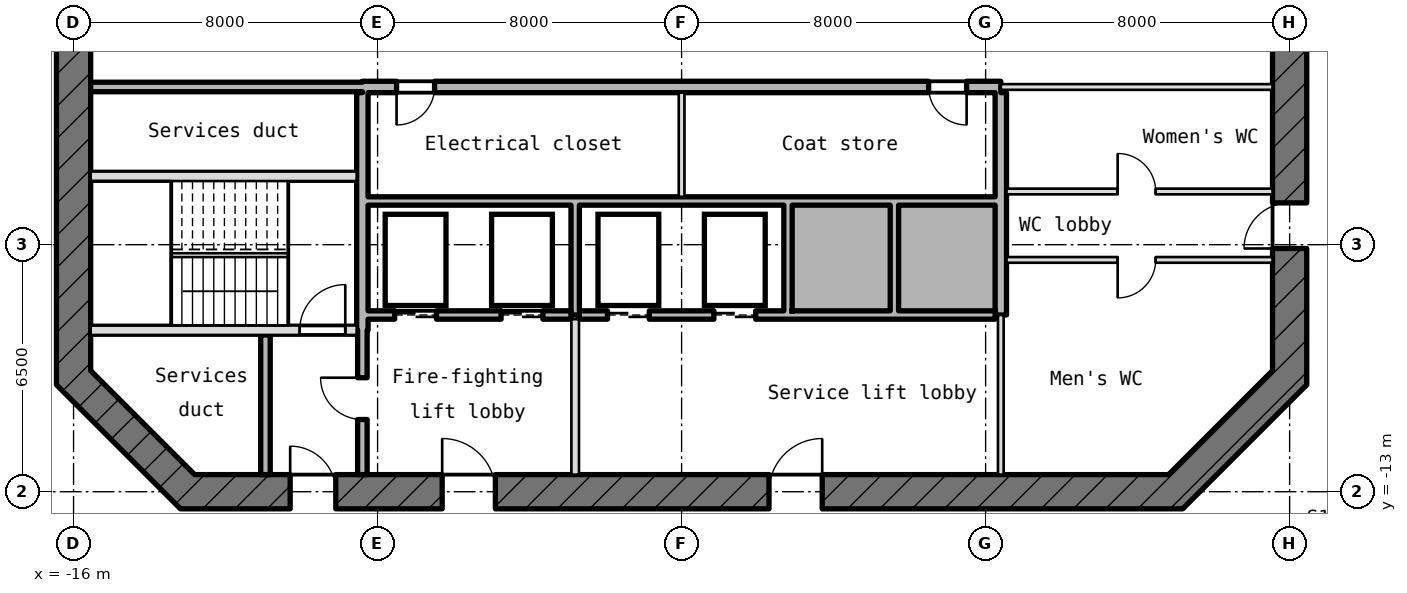
"""IFC4 building model, lengths in metres.
Left out: names, types, materials, properties, quantities, classifications, styles, units other than length and angle.
Written with IfcOpenShell. Run it as: python <this file> out.ifc"""

import sys

from ifc_helpers import new_model, si_unit, direction, frame, frame_2d, origin, place, context, subcontext, project, spatial, rectangle, extrude, element, fill, save


model = new_model("IFC4")
c1 = context("Model", 3, precision=1e-05, world=origin(), true_north=direction((0.0, 1.0)))
c2 = subcontext(c1, "Body", "Model", "MODEL_VIEW")
j1 = project(units=[si_unit("LENGTHUNIT", "METRE"), si_unit("PLANEANGLEUNIT", "RADIAN")], contexts=[c1])
p1 = place(None, origin())
s1 = spatial("IfcSite", under=j1, at=p1, CompositionType="ELEMENT")
p2 = place(p1, origin())
s2 = spatial("IfcBuilding", under=s1, at=p2, CompositionType="ELEMENT")
p3 = place(p2, frame((0.0, 0.0, 198.4)))
s3 = spatial("IfcBuildingStorey", under=s2, at=p3, CompositionType="ELEMENT", Elevation=198.4)
p4 = place(p3, frame((12.868, -13.132, -0.18), z_axis=(0.0, 0.0, 1.0), x_axis=(0.707106781187, 0.707106781187, 0.0)))
e1 = element("IfcWall", 1, at=p4, inside=s3, PredefinedType="SHEAR", context=c2, shape_type="SweptSolid", body=[
    extrude(rectangle(XDim=4.615, YDim=0.9, at=frame_2d((2.308, 0.0))), origin(), (0.0, 0.0, 1.0), 4.15),
])
p5 = place(p3, frame((16.0, -10.186, -0.18), z_axis=(0.0, 0.0, 1.0), x_axis=(0.0, 1.0, 0.0)))
e2 = element("IfcWall", 2, at=p5, inside=s3, PredefinedType="SHEAR", context=c2, shape_type="SweptSolid", body=[
    extrude(rectangle(XDim=20.373, YDim=0.9, at=frame_2d((10.186, 0.0))), origin(), (0.0, 0.0, 1.0), 4.15),
])
p6 = place(p5, frame((8.986, 0.0, 0.18)))
e3 = element("IfcOpeningElement", 3, at=p6, cuts=e2, PredefinedType="OPENING", context=c2, shape_type="SweptSolid", body=[
    extrude(rectangle(XDim=2.4, YDim=2.1, at=frame_2d((1.2, 1.05))), frame((0.0, 0.46, 0.0), z_axis=(0.0, -1.0, 0.0), x_axis=(1.0, 0.0, 0.0)), (0.0, 0.0, 1.0), 0.92),
])
p7 = place(p5, frame((13.586, 0.0, 0.18)))
e4 = element("IfcOpeningElement", 4, at=p7, cuts=e2, PredefinedType="OPENING", context=c2, shape_type="SweptSolid", body=[
    extrude(rectangle(XDim=1.2, YDim=2.1, at=frame_2d((0.6, 1.05))), frame((0.0, 0.46, 0.0), z_axis=(0.0, -1.0, 0.0), x_axis=(1.0, 0.0, 0.0)), (0.0, 0.0, 1.0), 0.92),
])
p8 = place(p5, frame((3.586, 0.0, 0.18)))
e5 = element("IfcOpeningElement", 5, at=p8, cuts=e2, PredefinedType="OPENING", context=c2, shape_type="SweptSolid", body=[
    extrude(rectangle(XDim=1.2, YDim=2.1, at=frame_2d((0.6, 1.05))), frame((0.0, 0.46, 0.0), z_axis=(0.0, -1.0, 0.0), x_axis=(1.0, 0.0, 0.0)), (0.0, 0.0, 1.0), 0.92),
])
p9 = place(p3, frame((-16.0, 10.186, -0.18), z_axis=(0.0, 0.0, 1.0), x_axis=(0.0, -1.0, 0.0)))
e6 = element("IfcWall", 6, at=p9, inside=s3, PredefinedType="SHEAR", context=c2, shape_type="SweptSolid", body=[
    extrude(rectangle(XDim=20.373, YDim=0.9, at=frame_2d((10.186, 0.0))), origin(), (0.0, 0.0, 1.0), 4.15),
])
p10 = place(p9, frame((8.986, 0.0, 0.18)))
e7 = element("IfcOpeningElement", 7, at=p10, cuts=e6, PredefinedType="OPENING", context=c2, shape_type="SweptSolid", body=[
    extrude(rectangle(XDim=2.4, YDim=2.1, at=frame_2d((1.2, 1.05))), frame((0.0, 0.46, 0.0), z_axis=(0.0, -1.0, 0.0), x_axis=(1.0, 0.0, 0.0)), (0.0, 0.0, 1.0), 0.92),
])
p11 = place(p9, frame((5.586, 0.0, 0.18)))
e8 = element("IfcOpeningElement", 8, at=p11, cuts=e6, PredefinedType="OPENING", context=c2, shape_type="SweptSolid", body=[
    extrude(rectangle(XDim=1.2, YDim=2.1, at=frame_2d((0.6, 1.05))), frame((0.0, 0.46, 0.0), z_axis=(0.0, -1.0, 0.0), x_axis=(1.0, 0.0, 0.0)), (0.0, 0.0, 1.0), 0.92),
])
p12 = place(p3, frame((-16.132, -9.868, -0.18), z_axis=(0.0, 0.0, 1.0), x_axis=(0.707106781187, -0.707106781187, 0.0)))
e9 = element("IfcWall", 9, at=p12, inside=s3, PredefinedType="SHEAR", context=c2, shape_type="SweptSolid", body=[
    extrude(rectangle(XDim=4.615, YDim=0.9, at=frame_2d((2.308, 0.0))), origin(), (0.0, 0.0, 1.0), 4.15),
])
p13 = place(p3, frame((-13.186, -13.0, -0.18), z_axis=(0.0, 0.0, 1.0), x_axis=(1.0, 0.0, 0.0)))
e10 = element("IfcWall", 10, at=p13, inside=s3, PredefinedType="SHEAR", context=c2, shape_type="SweptSolid", body=[
    extrude(rectangle(XDim=26.373, YDim=0.9, at=frame_2d((13.186, 0.0))), origin(), (0.0, 0.0, 1.0), 4.15),
])
p14 = place(p13, frame((2.886, 0.0, 0.18)))
e11 = element("IfcOpeningElement", 11, at=p14, cuts=e10, PredefinedType="OPENING", context=c2, shape_type="SweptSolid", body=[
    extrude(rectangle(XDim=1.2, YDim=2.1, at=frame_2d((0.6, 1.05))), frame((0.0, 0.46, 0.0), z_axis=(0.0, -1.0, 0.0), x_axis=(1.0, 0.0, 0.0)), (0.0, 0.0, 1.0), 0.92),
])
p15 = place(p13, frame((6.886, 0.0, 0.18)))
e12 = element("IfcOpeningElement", 12, at=p15, cuts=e10, PredefinedType="OPENING", context=c2, shape_type="SweptSolid", body=[
    extrude(rectangle(XDim=1.4, YDim=2.1, at=frame_2d((0.7, 1.05))), frame((0.0, 0.46, 0.0), z_axis=(0.0, -1.0, 0.0), x_axis=(1.0, 0.0, 0.0)), (0.0, 0.0, 1.0), 0.92),
])
p16 = place(p13, frame((15.486, 0.0, 0.18)))
e13 = element("IfcOpeningElement", 13, at=p16, cuts=e10, PredefinedType="OPENING", context=c2, shape_type="SweptSolid", body=[
    extrude(rectangle(XDim=1.4, YDim=2.1, at=frame_2d((0.7, 1.05))), frame((0.0, 0.46, 0.0), z_axis=(0.0, -1.0, 0.0), x_axis=(1.0, 0.0, 0.0)), (0.0, 0.0, 1.0), 0.92),
])
p17 = place(p3, frame((-15.55, -8.75, -0.18), z_axis=(0.0, 0.0, 1.0), x_axis=(1.0, 0.0, 0.0)))
e14 = element("IfcWall", 14, at=p17, inside=s3, PredefinedType="SHEAR", context=c2, shape_type="SweptSolid", body=[
    extrude(rectangle(XDim=7.0, YDim=0.25, at=frame_2d((3.5, 0.0))), origin(), (0.0, 0.0, 1.0), 4.15),
])
p18 = place(p17, frame((5.5, 0.0, 0.18)))
e15 = element("IfcOpeningElement", 15, at=p18, cuts=e14, PredefinedType="OPENING", context=c2, shape_type="SweptSolid", body=[
    extrude(rectangle(XDim=1.2, YDim=2.1, at=frame_2d((0.6, 1.05))), frame((0.0, 0.135, 0.0), z_axis=(0.0, -1.0, 0.0), x_axis=(1.0, 0.0, 0.0)), (0.0, 0.0, 1.0), 0.27),
])
p19 = place(p3, frame((-8.25, -8.35, 0.0), z_axis=(0.0, 0.0, 1.0), x_axis=(1.0, 0.0, 0.0)))
e16 = element("IfcWall", 16, at=p19, inside=s3, PredefinedType="STANDARD", context=c2, shape_type="SweptSolid", body=[
    extrude(rectangle(XDim=5.34, YDim=0.22, at=frame_2d((2.67, 0.0))), origin(), (0.0, 0.0, 1.0), 3.97),
])
p20 = place(p19, frame((0.7, 0.0, 0.0)))
e17 = element("IfcOpeningElement", 17, at=p20, cuts=e16, PredefinedType="OPENING", context=c2, shape_type="SweptSolid", body=[
    extrude(rectangle(XDim=1.1, YDim=2.1, at=frame_2d((0.55, 1.05))), frame((0.0, 0.12, 0.0), z_axis=(0.0, -1.0, 0.0), x_axis=(1.0, 0.0, 0.0)), (0.0, 0.0, 1.0), 0.24),
])
p21 = place(p19, frame((3.5, 0.0, 0.0)))
e18 = element("IfcOpeningElement", 18, at=p21, cuts=e16, PredefinedType="OPENING", context=c2, shape_type="SweptSolid", body=[
    extrude(rectangle(XDim=1.1, YDim=2.1, at=frame_2d((0.55, 1.05))), frame((0.0, 0.12, 0.0), z_axis=(0.0, -1.0, 0.0), x_axis=(1.0, 0.0, 0.0)), (0.0, 0.0, 1.0), 0.24),
])
p22 = place(p3, frame((-2.69, -8.35, 0.0), z_axis=(0.0, 0.0, 1.0), x_axis=(1.0, 0.0, 0.0)))
e19 = element("IfcWall", 19, at=p22, inside=s3, PredefinedType="STANDARD", context=c2, shape_type="SweptSolid", body=[
    extrude(rectangle(XDim=10.94, YDim=0.22, at=frame_2d((5.47, 0.0))), origin(), (0.0, 0.0, 1.0), 3.97),
])
p23 = place(p22, frame((0.74, 0.0, 0.0)))
e20 = element("IfcOpeningElement", 20, at=p23, cuts=e19, PredefinedType="OPENING", context=c2, shape_type="SweptSolid", body=[
    extrude(rectangle(XDim=1.1, YDim=2.1, at=frame_2d((0.55, 1.05))), frame((0.0, 0.12, 0.0), z_axis=(0.0, -1.0, 0.0), x_axis=(1.0, 0.0, 0.0)), (0.0, 0.0, 1.0), 0.24),
])
p24 = place(p22, frame((3.54, 0.0, 0.0)))
e21 = element("IfcOpeningElement", 21, at=p24, cuts=e19, PredefinedType="OPENING", context=c2, shape_type="SweptSolid", body=[
    extrude(rectangle(XDim=1.1, YDim=2.1, at=frame_2d((0.55, 1.05))), frame((0.0, 0.12, 0.0), z_axis=(0.0, -1.0, 0.0), x_axis=(1.0, 0.0, 0.0)), (0.0, 0.0, 1.0), 0.24),
])
p25 = place(p3, frame((8.55, -6.9, 0.0), z_axis=(0.0, 0.0, 1.0), x_axis=(1.0, 0.0, 0.0)))
e22 = element("IfcWall", 22, at=p25, inside=s3, PredefinedType="PARTITIONING", context=c2, shape_type="SweptSolid", body=[
    extrude(rectangle(XDim=7.0, YDim=0.15, at=frame_2d((3.5, 0.0))), origin(), (0.0, 0.0, 1.0), 3.97),
])
p26 = place(p25, frame((2.925, 0.0, 0.0)))
e23 = element("IfcOpeningElement", 23, at=p26, cuts=e22, PredefinedType="OPENING", context=c2, shape_type="SweptSolid", body=[
    extrude(rectangle(XDim=1.0, YDim=2.1, at=frame_2d((0.5, 1.05))), frame((0.0, 0.085, 0.0), z_axis=(0.0, -1.0, 0.0), x_axis=(1.0, 0.0, 0.0)), (0.0, 0.0, 1.0), 0.17),
])
p27 = place(p3, frame((-8.25, -5.35, 0.0), z_axis=(0.0, 0.0, 1.0), x_axis=(1.0, 0.0, 0.0)))
e24 = element("IfcWall", 24, at=p27, inside=s3, PredefinedType="STANDARD", context=c2, shape_type="SweptSolid", body=[
    extrude(rectangle(XDim=16.5, YDim=0.22, at=frame_2d((8.25, 0.0))), origin(), (0.0, 0.0, 1.0), 3.97),
])
p28 = place(p3, frame((8.55, -5.1, 0.0), z_axis=(0.0, 0.0, 1.0), x_axis=(1.0, 0.0, 0.0)))
e25 = element("IfcWall", 25, at=p28, inside=s3, PredefinedType="PARTITIONING", context=c2, shape_type="SweptSolid", body=[
    extrude(rectangle(XDim=7.0, YDim=0.15, at=frame_2d((3.5, 0.0))), origin(), (0.0, 0.0, 1.0), 3.97),
])
p29 = place(p28, frame((2.925, 0.0, 0.0)))
e26 = element("IfcOpeningElement", 26, at=p29, cuts=e25, PredefinedType="OPENING", context=c2, shape_type="SweptSolid", body=[
    extrude(rectangle(XDim=1.0, YDim=2.1, at=frame_2d((0.5, 1.05))), frame((0.0, 0.085, 0.0), z_axis=(0.0, -1.0, 0.0), x_axis=(1.0, 0.0, 0.0)), (0.0, 0.0, 1.0), 0.17),
])
p30 = place(p3, frame((-15.55, -4.7, -0.18), z_axis=(0.0, 0.0, 1.0), x_axis=(1.0, 0.0, 0.0)))
e27 = element("IfcWall", 27, at=p30, inside=s3, PredefinedType="SHEAR", context=c2, shape_type="SweptSolid", body=[
    extrude(rectangle(XDim=7.0, YDim=0.25, at=frame_2d((3.5, 0.0))), origin(), (0.0, 0.0, 1.0), 4.15),
])
p31 = place(p3, frame((-15.55, -2.35, 0.0), z_axis=(0.0, 0.0, 1.0), x_axis=(1.0, 0.0, 0.0)))
e28 = element("IfcWall", 28, at=p31, inside=s3, PredefinedType="STANDARD", context=c2, shape_type="SweptSolid", body=[
    extrude(rectangle(XDim=7.15, YDim=0.25, at=frame_2d((3.575, 0.0))), origin(), (0.0, 0.0, 1.0), 3.97),
])
p32 = place(p3, frame((-8.4, -2.35, -0.18), z_axis=(0.0, 0.0, 1.0), x_axis=(1.0, 0.0, 0.0)))
e29 = element("IfcWall", 29, at=p32, inside=s3, PredefinedType="SHEAR", context=c2, shape_type="SweptSolid", body=[
    extrude(rectangle(XDim=16.8, YDim=0.3, at=frame_2d((8.4, 0.0))), origin(), (0.0, 0.0, 1.0), 4.15),
])
p33 = place(p32, frame((0.9, 0.0, 0.18)))
e30 = element("IfcOpeningElement", 30, at=p33, cuts=e29, PredefinedType="OPENING", context=c2, shape_type="SweptSolid", body=[
    extrude(rectangle(XDim=1.0, YDim=2.1, at=frame_2d((0.5, 1.05))), frame((0.0, 0.16, 0.0), z_axis=(0.0, -1.0, 0.0), x_axis=(1.0, 0.0, 0.0)), (0.0, 0.0, 1.0), 0.32),
])
p34 = place(p32, frame((14.9, 0.0, 0.18)))
e31 = element("IfcOpeningElement", 31, at=p34, cuts=e29, PredefinedType="OPENING", context=c2, shape_type="SweptSolid", body=[
    extrude(rectangle(XDim=1.0, YDim=2.1, at=frame_2d((0.5, 1.05))), frame((0.0, 0.16, 0.0), z_axis=(0.0, -1.0, 0.0), x_axis=(1.0, 0.0, 0.0)), (0.0, 0.0, 1.0), 0.32),
])
p35 = place(p3, frame((8.4, -2.35, 0.0), z_axis=(0.0, 0.0, 1.0), x_axis=(1.0, 0.0, 0.0)))
e32 = element("IfcWall", 32, at=p35, inside=s3, PredefinedType="PARTITIONING", context=c2, shape_type="SweptSolid", body=[
    extrude(rectangle(XDim=7.15, YDim=0.15, at=frame_2d((3.575, 0.0))), origin(), (0.0, 0.0, 1.0), 3.97),
])
p36 = place(p3, frame((-10.95, -12.55, 0.0), z_axis=(0.0, 0.0, 1.0), x_axis=(0.0, 1.0, 0.0)))
e33 = element("IfcWall", 33, at=p36, inside=s3, PredefinedType="STANDARD", context=c2, shape_type="SweptSolid", body=[
    extrude(rectangle(XDim=3.675, YDim=0.25, at=frame_2d((1.837, 0.0))), origin(), (0.0, 0.0, 1.0), 3.97),
])
p37 = place(p3, frame((-8.4, -12.55, 0.0), z_axis=(0.0, 0.0, 1.0), x_axis=(0.0, 1.0, 0.0)))
e34 = element("IfcWall", 34, at=p37, inside=s3, PredefinedType="STANDARD", context=c2, shape_type="SweptSolid", body=[
    extrude(rectangle(XDim=3.8, YDim=0.25, at=frame_2d((1.9, 0.0))), origin(), (0.0, 0.0, 1.0), 3.97),
])
p38 = place(p37, frame((1.45, 0.0, 0.0)))
e35 = element("IfcOpeningElement", 35, at=p38, cuts=e34, PredefinedType="OPENING", context=c2, shape_type="SweptSolid", body=[
    extrude(rectangle(XDim=1.1, YDim=2.1, at=frame_2d((0.55, 1.05))), frame((0.0, 0.135, 0.0), z_axis=(0.0, -1.0, 0.0), x_axis=(1.0, 0.0, 0.0)), (0.0, 0.0, 1.0), 0.27),
])
p39 = place(p3, frame((-8.4, -8.75, -0.18), z_axis=(0.0, 0.0, 1.0), x_axis=(0.0, 1.0, 0.0)))
e36 = element("IfcWall", 36, at=p39, inside=s3, PredefinedType="SHEAR", context=c2, shape_type="SweptSolid", body=[
    extrude(rectangle(XDim=6.25, YDim=0.3, at=frame_2d((3.125, 0.0))), origin(), (0.0, 0.0, 1.0), 4.15),
])
p40 = place(p3, frame((-2.8, -12.55, 0.0), z_axis=(0.0, 0.0, 1.0), x_axis=(0.0, 1.0, 0.0)))
e37 = element("IfcWall", 37, at=p40, inside=s3, PredefinedType="PARTITIONING", context=c2, shape_type="SweptSolid", body=[
    extrude(rectangle(XDim=4.09, YDim=0.2, at=frame_2d((2.045, 0.0))), origin(), (0.0, 0.0, 1.0), 3.97),
])
p41 = place(p3, frame((-2.8, -8.35, 0.0), z_axis=(0.0, 0.0, 1.0), x_axis=(0.0, 1.0, 0.0)))
e38 = element("IfcWall", 38, at=p41, inside=s3, PredefinedType="STANDARD", context=c2, shape_type="SweptSolid", body=[
    extrude(rectangle(XDim=2.89, YDim=0.22, at=frame_2d((1.445, 0.0))), origin(), (0.0, 0.0, 1.0), 3.97),
])
p42 = place(p3, frame((0.0, -5.24, 0.0), z_axis=(0.0, 0.0, 1.0), x_axis=(0.0, 1.0, 0.0)))
e39 = element("IfcWall", 39, at=p42, inside=s3, PredefinedType="PARTITIONING", context=c2, shape_type="SweptSolid", body=[
    extrude(rectangle(XDim=2.74, YDim=0.15, at=frame_2d((1.37, 0.0))), origin(), (0.0, 0.0, 1.0), 3.97),
])
for number, where, z_axis, x_axis in (
    (40, (2.8, -8.24, 0.0), (0.0, 0.0, 1.0), (0.0, 1.0, 0.0)),
    (41, (5.6, -8.24, 0.0), (0.0, 0.0, 1.0), (0.0, 1.0, 0.0)),
):
    element("IfcWall", number, at=place(p3, frame(where, z_axis=z_axis, x_axis=x_axis)), inside=s3, PredefinedType="STANDARD", context=c2, shape_type="SweptSolid", body=[
        extrude(rectangle(XDim=2.78, YDim=0.22, at=frame_2d((1.39, 0.0))), origin(), (0.0, 0.0, 1.0), 3.97),
    ])
p43 = place(p3, frame((8.4, -12.55, 0.0), z_axis=(0.0, 0.0, 1.0), x_axis=(0.0, 1.0, 0.0)))
e42 = element("IfcWall", 42, at=p43, inside=s3, PredefinedType="PARTITIONING", context=c2, shape_type="SweptSolid", body=[
    extrude(rectangle(XDim=4.2, YDim=0.15, at=frame_2d((2.1, 0.0))), origin(), (0.0, 0.0, 1.0), 3.97),
])
p44 = place(p3, frame((8.4, -8.35, -0.18), z_axis=(0.0, 0.0, 1.0), x_axis=(0.0, 1.0, 0.0)))
e43 = element("IfcWall", 43, at=p44, inside=s3, PredefinedType="SHEAR", context=c2, shape_type="SweptSolid", body=[
    extrude(rectangle(XDim=5.85, YDim=0.3, at=frame_2d((2.925, 0.0))), origin(), (0.0, 0.0, 1.0), 4.15),
])
p45 = place(p20, origin())
e44 = element("IfcDoor", 44, at=p45, inside=s3, OperationType="DOUBLE_DOOR_SLIDING", PredefinedType="DOOR", context=c2, shape_type="SweptSolid", body=[
    extrude(rectangle(XDim=1.1, YDim=2.1, at=frame_2d((0.55, 1.05))), frame((0.0, 0.025, 0.0), z_axis=(0.0, -1.0, 0.0), x_axis=(1.0, 0.0, 0.0)), (0.0, 0.0, 1.0), 0.05),
])
fill(e17, e44)
p46 = place(p21, origin())
e45 = element("IfcDoor", 45, at=p46, inside=s3, OperationType="DOUBLE_DOOR_SLIDING", PredefinedType="DOOR", context=c2, shape_type="SweptSolid", body=[
    extrude(rectangle(XDim=1.1, YDim=2.1, at=frame_2d((0.55, 1.05))), frame((0.0, 0.025, 0.0), z_axis=(0.0, -1.0, 0.0), x_axis=(1.0, 0.0, 0.0)), (0.0, 0.0, 1.0), 0.05),
])
fill(e18, e45)
p47 = place(p23, origin())
e46 = element("IfcDoor", 46, at=p47, inside=s3, OperationType="DOUBLE_DOOR_SLIDING", PredefinedType="DOOR", context=c2, shape_type="SweptSolid", body=[
    extrude(rectangle(XDim=1.1, YDim=2.1, at=frame_2d((0.55, 1.05))), frame((0.0, 0.025, 0.0), z_axis=(0.0, -1.0, 0.0), x_axis=(1.0, 0.0, 0.0)), (0.0, 0.0, 1.0), 0.05),
])
fill(e20, e46)
p48 = place(p24, origin())
e47 = element("IfcDoor", 47, at=p48, inside=s3, OperationType="DOUBLE_DOOR_SLIDING", PredefinedType="DOOR", context=c2, shape_type="SweptSolid", body=[
    extrude(rectangle(XDim=1.1, YDim=2.1, at=frame_2d((0.55, 1.05))), frame((0.0, 0.025, 0.0), z_axis=(0.0, -1.0, 0.0), x_axis=(1.0, 0.0, 0.0)), (0.0, 0.0, 1.0), 0.05),
])
fill(e21, e47)
p49 = place(p18, origin())
e48 = element("IfcDoor", 48, at=p49, inside=s3, OperationType="SINGLE_SWING_RIGHT", PredefinedType="DOOR", context=c2, shape_type="SweptSolid", body=[
    extrude(rectangle(XDim=1.2, YDim=2.1, at=frame_2d((0.6, 1.05))), frame((0.0, 0.025, 0.0), z_axis=(0.0, -1.0, 0.0), x_axis=(1.0, 0.0, 0.0)), (0.0, 0.0, 1.0), 0.05),
])
fill(e15, e48)
p50 = place(p38, origin())
e49 = element("IfcDoor", 49, at=p50, inside=s3, OperationType="SINGLE_SWING_RIGHT", PredefinedType="DOOR", context=c2, shape_type="SweptSolid", body=[
    extrude(rectangle(XDim=1.1, YDim=2.1, at=frame_2d((0.55, 1.05))), frame((0.0, 0.025, 0.0), z_axis=(0.0, -1.0, 0.0), x_axis=(1.0, 0.0, 0.0)), (0.0, 0.0, 1.0), 0.05),
])
fill(e35, e49)
p51 = place(p14, origin())
e50 = element("IfcDoor", 50, at=p51, inside=s3, OperationType="SINGLE_SWING_RIGHT", PredefinedType="DOOR", context=c2, shape_type="SweptSolid", body=[
    extrude(rectangle(XDim=1.2, YDim=2.1, at=frame_2d((0.6, 1.05))), frame((0.0, 0.025, 0.0), z_axis=(0.0, -1.0, 0.0), x_axis=(1.0, 0.0, 0.0)), (0.0, 0.0, 1.0), 0.05),
])
fill(e11, e50)
p52 = place(p15, origin())
e51 = element("IfcDoor", 51, at=p52, inside=s3, OperationType="SINGLE_SWING_RIGHT", PredefinedType="DOOR", context=c2, shape_type="SweptSolid", body=[
    extrude(rectangle(XDim=1.4, YDim=2.1, at=frame_2d((0.7, 1.05))), frame((0.0, 0.025, 0.0), z_axis=(0.0, -1.0, 0.0), x_axis=(1.0, 0.0, 0.0)), (0.0, 0.0, 1.0), 0.05),
])
fill(e12, e51)
p53 = place(p16, origin())
e52 = element("IfcDoor", 52, at=p53, inside=s3, OperationType="SINGLE_SWING_RIGHT", PredefinedType="DOOR", context=c2, shape_type="SweptSolid", body=[
    extrude(rectangle(XDim=1.4, YDim=2.1, at=frame_2d((0.7, 1.05))), frame((0.0, 0.025, 0.0), z_axis=(0.0, -1.0, 0.0), x_axis=(1.0, 0.0, 0.0)), (0.0, 0.0, 1.0), 0.05),
])
fill(e13, e52)
p54 = place(p33, frame((1.0, 0.0, 0.0), z_axis=(0.0, 0.0, 1.0), x_axis=(-1.0, 0.0, 0.0)))
e53 = element("IfcDoor", 53, at=p54, inside=s3, OperationType="SINGLE_SWING_LEFT", PredefinedType="DOOR", context=c2, shape_type="SweptSolid", body=[
    extrude(rectangle(XDim=1.0, YDim=2.1, at=frame_2d((0.5, 1.05))), frame((0.0, 0.025, 0.0), z_axis=(0.0, -1.0, 0.0), x_axis=(1.0, 0.0, 0.0)), (0.0, 0.0, 1.0), 0.05),
])
fill(e30, e53)
p55 = place(p34, frame((1.0, 0.0, 0.0), z_axis=(0.0, 0.0, 1.0), x_axis=(-1.0, 0.0, 0.0)))
e54 = element("IfcDoor", 54, at=p55, inside=s3, OperationType="SINGLE_SWING_LEFT", PredefinedType="DOOR", context=c2, shape_type="SweptSolid", body=[
    extrude(rectangle(XDim=1.0, YDim=2.1, at=frame_2d((0.5, 1.05))), frame((0.0, 0.025, 0.0), z_axis=(0.0, -1.0, 0.0), x_axis=(1.0, 0.0, 0.0)), (0.0, 0.0, 1.0), 0.05),
])
fill(e31, e54)
p56 = place(p29, origin())
e55 = element("IfcDoor", 55, at=p56, inside=s3, OperationType="SINGLE_SWING_RIGHT", PredefinedType="DOOR", context=c2, shape_type="SweptSolid", body=[
    extrude(rectangle(XDim=1.0, YDim=2.1, at=frame_2d((0.5, 1.05))), frame((0.0, 0.025, 0.0), z_axis=(0.0, -1.0, 0.0), x_axis=(1.0, 0.0, 0.0)), (0.0, 0.0, 1.0), 0.05),
])
fill(e26, e55)
p57 = place(p8, origin())
e56 = element("IfcDoor", 56, at=p57, inside=s3, OperationType="SINGLE_SWING_RIGHT", PredefinedType="DOOR", context=c2, shape_type="SweptSolid", body=[
    extrude(rectangle(XDim=1.2, YDim=2.1, at=frame_2d((0.6, 1.05))), frame((0.0, 0.025, 0.0), z_axis=(0.0, -1.0, 0.0), x_axis=(1.0, 0.0, 0.0)), (0.0, 0.0, 1.0), 0.05),
])
fill(e5, e56)
p58 = place(p26, frame((1.0, 0.0, 0.0), z_axis=(0.0, 0.0, 1.0), x_axis=(-1.0, 0.0, 0.0)))
e57 = element("IfcDoor", 57, at=p58, inside=s3, OperationType="SINGLE_SWING_LEFT", PredefinedType="DOOR", context=c2, shape_type="SweptSolid", body=[
    extrude(rectangle(XDim=1.0, YDim=2.1, at=frame_2d((0.5, 1.05))), frame((0.0, 0.025, 0.0), z_axis=(0.0, -1.0, 0.0), x_axis=(1.0, 0.0, 0.0)), (0.0, 0.0, 1.0), 0.05),
])
fill(e23, e57)
save(model, sys.argv[1])
